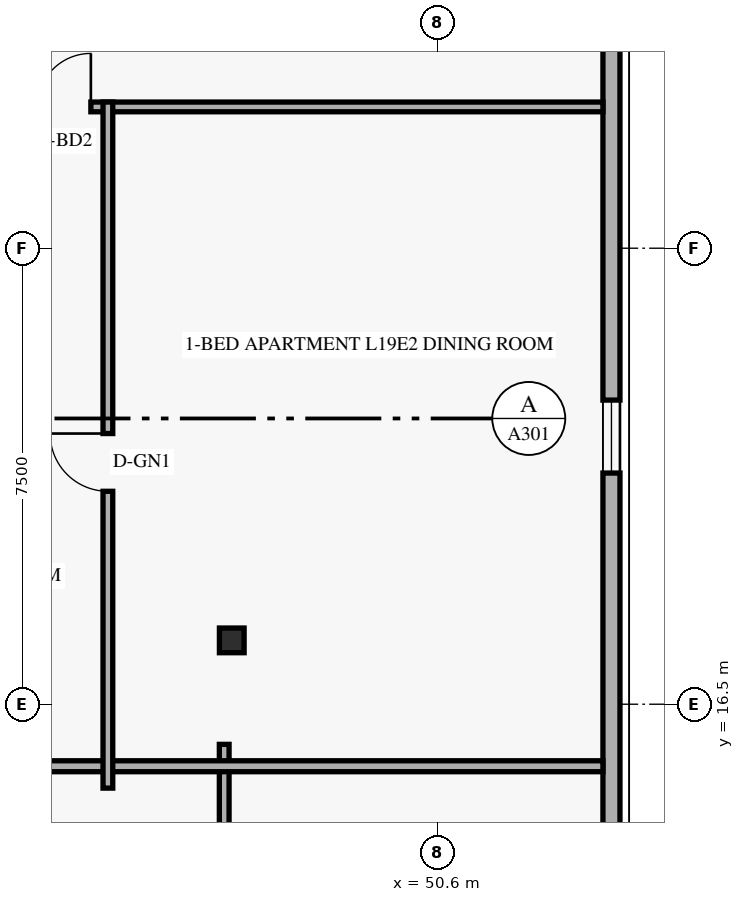
"""IFC4 building model, lengths in metres.
Left out: names, types, materials, properties, quantities, classifications, styles, units other than length and angle.
Written with IfcOpenShell. Run it as: python <this file> out.ifc"""

import sys

from ifc_helpers import new_model, si_unit, direction, frame, frame_2d, origin, origin_2d, place, context, subcontext, project, spatial, rectangle, hollow_rectangle, extrude, element, fill, save


model = new_model("IFC4")
c1 = context("Model", 3, precision=1e-05, world=origin(), true_north=direction((0.0, 1.0)))
c2 = subcontext(c1, "Body", "Model", "MODEL_VIEW")
j1 = project(units=[si_unit("LENGTHUNIT", "METRE"), si_unit("PLANEANGLEUNIT", "RADIAN")], contexts=[c1])
p1 = place(None, origin())
s1 = spatial("IfcSite", under=j1, at=p1, CompositionType="ELEMENT")
p2 = place(p1, origin())
s2 = spatial("IfcBuilding", under=s1, at=p2, CompositionType="ELEMENT")
p3 = place(p2, frame((0.0, 0.0, 76.8)))
s3 = spatial("IfcBuildingStorey", under=s2, at=p3, CompositionType="ELEMENT", Elevation=76.8)
p4 = place(p3, frame((47.111, 17.55, 0.0), z_axis=(0.057955997462, 0.0, 0.998319138531), x_axis=(0.0, 1.0, 0.0)))
e1 = element("IfcColumn", 1, at=p4, inside=s3, PredefinedType="COLUMN", context=c2, shape_type="SweptSolid", body=[
    extrude(hollow_rectangle(XDim=0.406, YDim=0.406, WallThickness=0.016, at=origin_2d()), origin(), (0.0, 0.0, 1.0), 3.606),
])
p5 = place(p3, frame((53.46, 6.32, 0.0), z_axis=(0.0, 0.0, 1.0), x_axis=(0.0, 1.0, 0.0)))
e2 = element("IfcWall", 2, at=p5, inside=s3, PredefinedType="SOLIDWALL", context=c2, shape_type="SweptSolid", body=[
    extrude(rectangle(XDim=35.36, YDim=0.28, at=frame_2d((17.68, 0.0))), origin(), (0.0, 0.0, 1.0), 3.36),
])
p6 = place(p5, frame((4.24, 0.0, 0.85)))
e3 = element("IfcOpeningElement", 3, at=p6, cuts=e2, PredefinedType="OPENING", context=c2, shape_type="SweptSolid", body=[
    extrude(rectangle(XDim=1.2, YDim=1.5, at=frame_2d((0.6, 0.75))), frame((0.0, 0.15, 0.0), z_axis=(0.0, -1.0, 0.0), x_axis=(1.0, 0.0, 0.0)), (0.0, 0.0, 1.0), 0.3),
])
p7 = place(p5, frame((13.982, 0.0, 0.85)))
e4 = element("IfcOpeningElement", 4, at=p7, cuts=e2, PredefinedType="OPENING", context=c2, shape_type="SweptSolid", body=[
    extrude(rectangle(XDim=1.2, YDim=1.5, at=frame_2d((0.6, 0.75))), frame((0.0, 0.15, 0.0), z_axis=(0.0, -1.0, 0.0), x_axis=(1.0, 0.0, 0.0)), (0.0, 0.0, 1.0), 0.3),
])
p8 = place(p5, frame((21.224, 0.0, 0.85)))
e5 = element("IfcOpeningElement", 5, at=p8, cuts=e2, PredefinedType="OPENING", context=c2, shape_type="SweptSolid", body=[
    extrude(rectangle(XDim=1.2, YDim=1.5, at=frame_2d((0.6, 0.75))), frame((0.0, 0.15, 0.0), z_axis=(0.0, -1.0, 0.0), x_axis=(1.0, 0.0, 0.0)), (0.0, 0.0, 1.0), 0.3),
])
p9 = place(p5, frame((25.989, 0.0, 0.85)))
e6 = element("IfcOpeningElement", 6, at=p9, cuts=e2, PredefinedType="OPENING", context=c2, shape_type="SweptSolid", body=[
    extrude(rectangle(XDim=1.2, YDim=1.5, at=frame_2d((0.6, 0.75))), frame((0.0, 0.15, 0.0), z_axis=(0.0, -1.0, 0.0), x_axis=(1.0, 0.0, 0.0)), (0.0, 0.0, 1.0), 0.3),
])
p10 = place(p5, frame((31.847, 0.0, 0.85)))
e7 = element("IfcOpeningElement", 7, at=p10, cuts=e2, PredefinedType="OPENING", context=c2, shape_type="SweptSolid", body=[
    extrude(rectangle(XDim=1.2, YDim=1.5, at=frame_2d((0.6, 0.75))), frame((0.0, 0.15, 0.0), z_axis=(0.0, -1.0, 0.0), x_axis=(1.0, 0.0, 0.0)), (0.0, 0.0, 1.0), 0.3),
])
p11 = place(p3, frame((47.091, 6.76, 0.0), z_axis=(0.0, 0.0, 1.0), x_axis=(0.0, 1.0, 0.0)))
e8 = element("IfcWall", 8, at=p11, inside=s3, PredefinedType="PARTITIONING", context=c2, shape_type="SweptSolid", body=[
    extrude(rectangle(XDim=9.08, YDim=0.16, at=frame_2d((4.54, 0.0))), origin(), (0.0, 0.0, 1.0), 2.731),
])
p12 = place(p11, frame((3.78, 0.0, 0.0)))
e9 = element("IfcOpeningElement", 9, at=p12, cuts=e8, PredefinedType="OPENING", context=c2, shape_type="SweptSolid", body=[
    extrude(rectangle(XDim=0.95, YDim=2.15, at=frame_2d((0.475, 1.075))), frame((0.0, 0.09, 0.0), z_axis=(0.0, -1.0, 0.0), x_axis=(1.0, 0.0, 0.0)), (0.0, 0.0, 1.0), 0.18),
])
p13 = place(p3, frame((37.64, 15.48, 0.0), z_axis=(0.0, 0.0, 1.0), x_axis=(1.0, 0.0, 0.0)))
e10 = element("IfcWall", 10, at=p13, inside=s3, PredefinedType="PARTITIONING", context=c2, shape_type="SweptSolid", body=[
    extrude(rectangle(XDim=15.68, YDim=0.18, at=frame_2d((7.84, 0.0))), origin(), (0.0, 0.0, 1.0), 2.731),
])
p14 = place(p3, frame((37.64, 26.324, 0.0), z_axis=(0.0, 0.0, 1.0), x_axis=(1.0, 0.0, 0.0)))
e11 = element("IfcWall", 11, at=p14, inside=s3, PredefinedType="PARTITIONING", context=c2, shape_type="SweptSolid", body=[
    extrude(rectangle(XDim=15.68, YDim=0.16, at=frame_2d((7.84, 0.0))), origin(), (0.0, 0.0, 1.0), 2.731),
])
p15 = place(p14, frame((3.975, 0.0, 0.0)))
e12 = element("IfcOpeningElement", 12, at=p15, cuts=e11, PredefinedType="OPENING", context=c2, shape_type="SweptSolid", body=[
    extrude(rectangle(XDim=0.88, YDim=2.14, at=frame_2d((0.44, 1.07))), frame((0.0, 0.09, 0.0), z_axis=(0.0, -1.0, 0.0), x_axis=(1.0, 0.0, 0.0)), (0.0, 0.0, 1.0), 0.18),
])
p16 = place(p14, frame((6.378, 0.0, 0.0)))
e13 = element("IfcOpeningElement", 13, at=p16, cuts=e11, PredefinedType="OPENING", context=c2, shape_type="SweptSolid", body=[
    extrude(rectangle(XDim=0.88, YDim=2.14, at=frame_2d((0.44, 1.07))), frame((0.0, 0.09, 0.0), z_axis=(0.0, -1.0, 0.0), x_axis=(1.0, 0.0, 0.0)), (0.0, 0.0, 1.0), 0.18),
])
p17 = place(p3, frame((45.178, 15.12, 0.0), z_axis=(0.0, 0.0, 1.0), x_axis=(0.0, 1.0, 0.0)))
e14 = element("IfcWall", 14, at=p17, inside=s3, PredefinedType="PARTITIONING", context=c2, shape_type="SweptSolid", body=[
    extrude(rectangle(XDim=11.284, YDim=0.16, at=frame_2d((5.642, 0.0))), origin(), (0.0, 0.0, 1.0), 2.731),
])
p18 = place(p17, frame((4.882, 0.0, 0.0)))
e15 = element("IfcOpeningElement", 15, at=p18, cuts=e14, PredefinedType="OPENING", context=c2, shape_type="SweptSolid", body=[
    extrude(rectangle(XDim=0.95, YDim=2.15, at=frame_2d((0.475, 1.075))), frame((0.0, 0.09, 0.0), z_axis=(0.0, -1.0, 0.0), x_axis=(1.0, 0.0, 0.0)), (0.0, 0.0, 1.0), 0.18),
])
p19 = place(p7, origin())
e16 = element("IfcWindow", 16, at=p19, inside=s3, PartitioningType="SINGLE_PANEL", PredefinedType="WINDOW", context=c2, shape_type="SweptSolid", body=[
    extrude(rectangle(XDim=1.2, YDim=1.5, at=frame_2d((0.6, 0.75))), frame((0.0, 0.03, 0.0), z_axis=(0.0, -1.0, 0.0), x_axis=(1.0, 0.0, 0.0)), (0.0, 0.0, 1.0), 0.06),
])
fill(e4, e16)
p20 = place(p18, origin())
e17 = element("IfcDoor", 17, at=p20, inside=s3, OperationType="SINGLE_SWING_RIGHT", PredefinedType="DOOR", context=c2, shape_type="SweptSolid", body=[
    extrude(rectangle(XDim=0.95, YDim=2.15, at=frame_2d((0.475, 1.075))), frame((0.0, 0.025, 0.0), z_axis=(0.0, -1.0, 0.0), x_axis=(1.0, 0.0, 0.0)), (0.0, 0.0, 1.0), 0.05),
])
fill(e15, e17)
p21 = place(p16, origin())
e18 = element("IfcDoor", 18, at=p21, inside=s3, OperationType="SINGLE_SWING_RIGHT", PredefinedType="DOOR", context=c2, shape_type="SweptSolid", body=[
    extrude(rectangle(XDim=0.88, YDim=2.14, at=frame_2d((0.44, 1.07))), frame((0.0, 0.025, 0.0), z_axis=(0.0, -1.0, 0.0), x_axis=(1.0, 0.0, 0.0)), (0.0, 0.0, 1.0), 0.05),
])
fill(e13, e18)
save(model, sys.argv[1])
